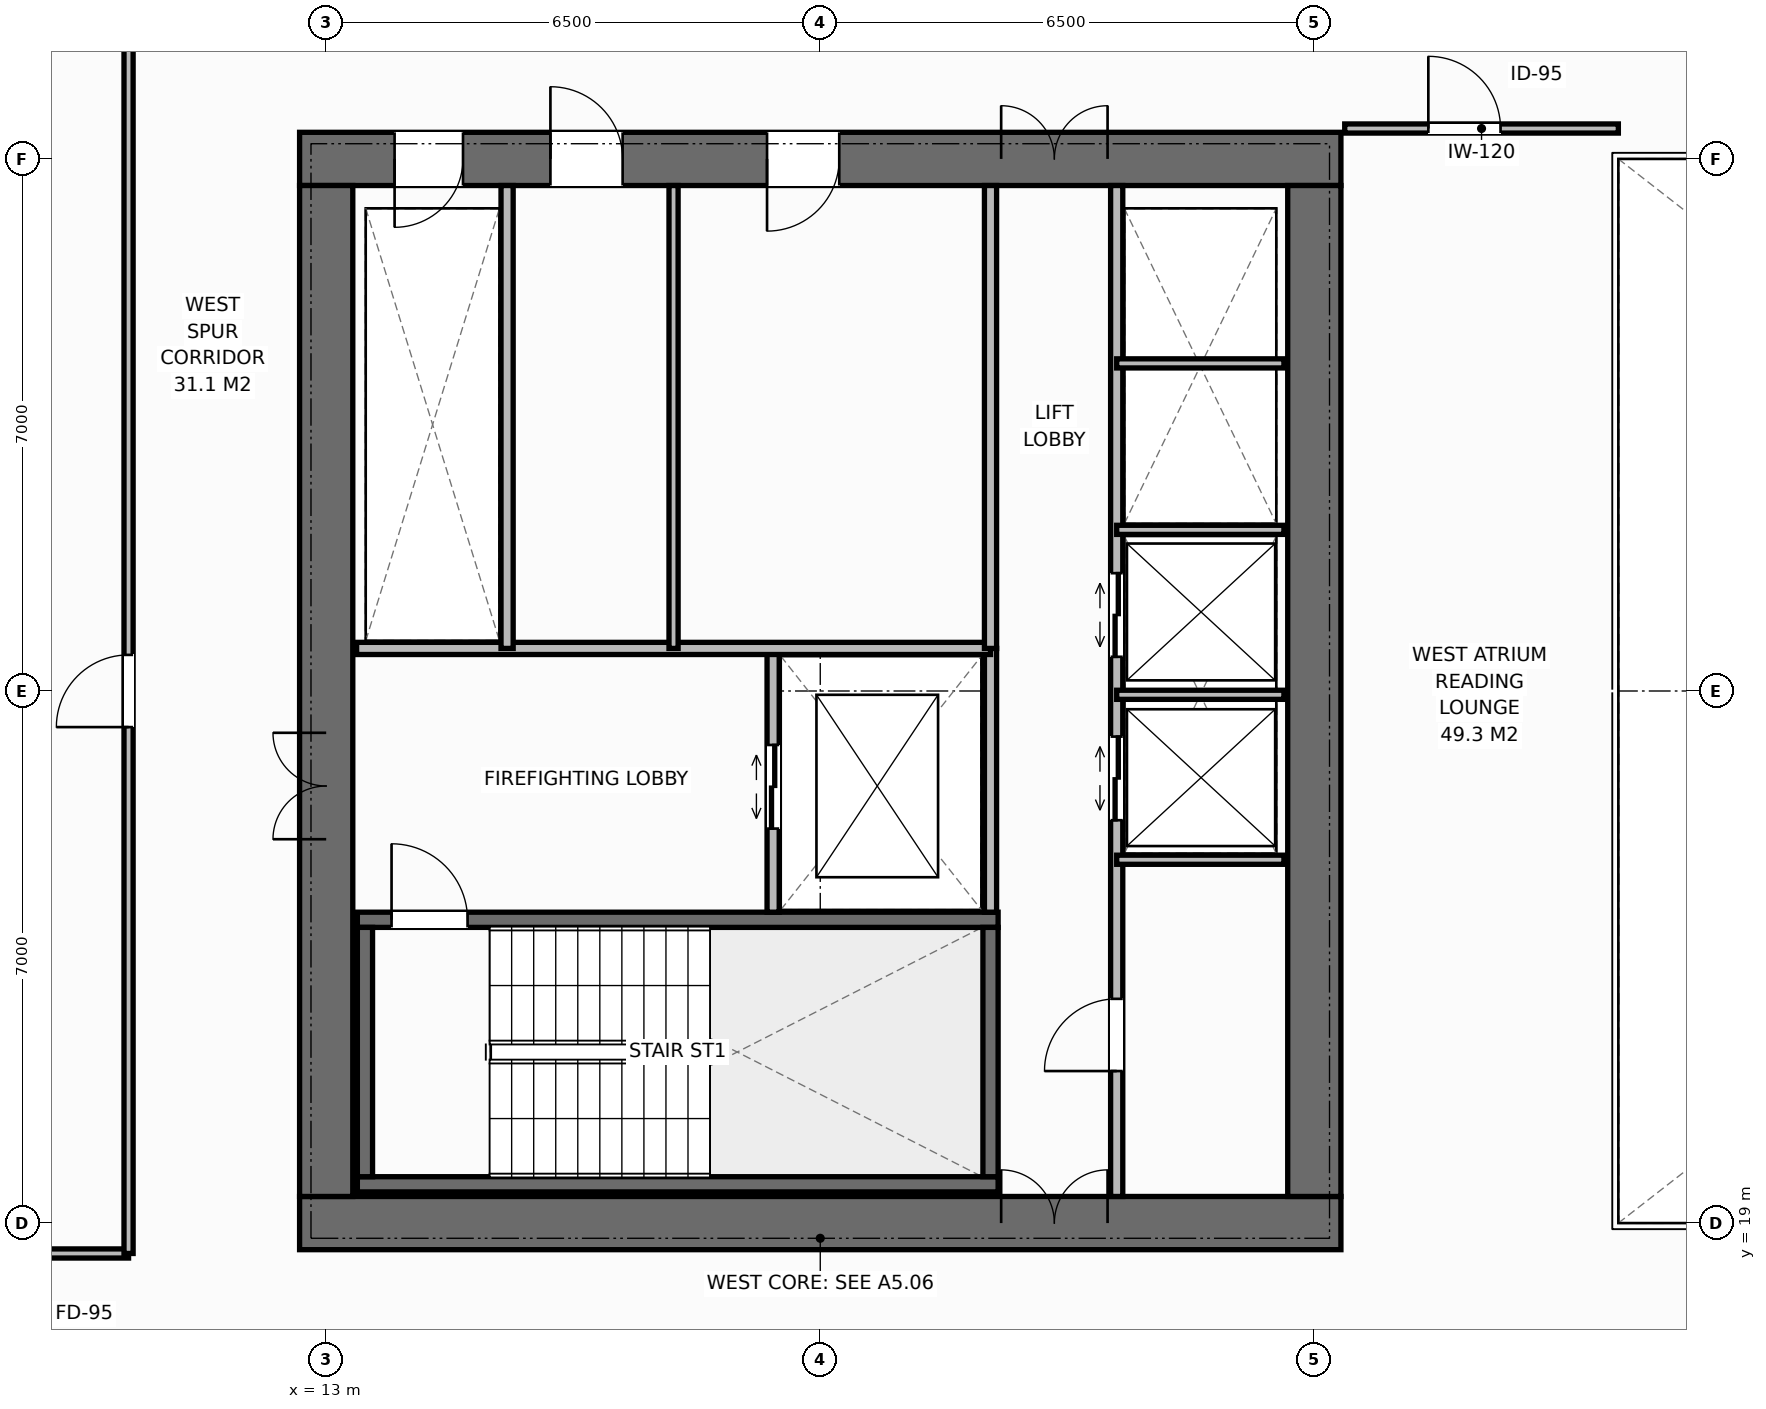
"""IFC4 building model, lengths in metres.
Left out: names, types, materials, properties, quantities, classifications, styles, units other than length and angle.
Written with IfcOpenShell. Run it as: python <this file> out.ifc"""

import sys

from ifc_helpers import new_model, si_unit, direction, frame, frame_2d, origin, place, context, subcontext, project, spatial, rectangle, extrude, element, fill, save


model = new_model("IFC4")
c1 = context("Model", 3, precision=1e-05, world=origin(), true_north=direction((0.0, 1.0)))
c2 = subcontext(c1, "Body", "Model", "MODEL_VIEW")
j1 = project(units=[si_unit("LENGTHUNIT", "METRE"), si_unit("PLANEANGLEUNIT", "RADIAN")], contexts=[c1])
p1 = place(None, origin())
s1 = spatial("IfcSite", under=j1, at=p1, CompositionType="ELEMENT")
p2 = place(p1, origin())
s2 = spatial("IfcBuilding", under=s1, at=p2, CompositionType="ELEMENT")
p3 = place(p2, frame((0.0, 0.0, 97.4)))
s3 = spatial("IfcBuildingStorey", under=s2, at=p3, CompositionType="ELEMENT", Elevation=97.4)
p4 = place(p3, frame((12.65, 19.0, 0.0), z_axis=(0.0, 0.0, 1.0), x_axis=(1.0, 0.0, 0.0)))
e1 = element("IfcWall", 1, at=p4, inside=s3, PredefinedType="SHEAR", context=c2, shape_type="SweptSolid", body=[
    extrude(rectangle(XDim=13.7, YDim=0.7, at=frame_2d((6.85, 0.0))), origin(), (0.0, 0.0, 1.0), 3.8),
])
p5 = place(p4, frame((9.23, 0.0, 0.0)))
e2 = element("IfcOpeningElement", 2, at=p5, cuts=e1, PredefinedType="OPENING", context=c2, shape_type="SweptSolid", body=[
    extrude(rectangle(XDim=1.4, YDim=2.2, at=frame_2d((0.7, 1.1))), frame((0.0, 0.36, 0.0), z_axis=(0.0, -1.0, 0.0), x_axis=(1.0, 0.0, 0.0)), (0.0, 0.0, 1.0), 0.72),
])
p6 = place(p3, frame((12.65, 33.0, 0.0), z_axis=(0.0, 0.0, 1.0), x_axis=(1.0, 0.0, 0.0)))
e3 = element("IfcWall", 3, at=p6, inside=s3, PredefinedType="SHEAR", context=c2, shape_type="SweptSolid", body=[
    extrude(rectangle(XDim=13.7, YDim=0.7, at=frame_2d((6.85, 0.0))), origin(), (0.0, 0.0, 1.0), 3.8),
])
p7 = place(p6, frame((1.25, 0.0, 0.0)))
e4 = element("IfcOpeningElement", 4, at=p7, cuts=e3, PredefinedType="OPENING", context=c2, shape_type="SweptSolid", body=[
    extrude(rectangle(XDim=0.9, YDim=2.15, at=frame_2d((0.45, 1.075))), frame((0.0, 0.36, 0.0), z_axis=(0.0, -1.0, 0.0), x_axis=(1.0, 0.0, 0.0)), (0.0, 0.0, 1.0), 0.72),
])
p8 = place(p6, frame((3.3, 0.0, 0.0)))
e5 = element("IfcOpeningElement", 5, at=p8, cuts=e3, PredefinedType="OPENING", context=c2, shape_type="SweptSolid", body=[
    extrude(rectangle(XDim=0.95, YDim=2.15, at=frame_2d((0.475, 1.075))), frame((0.0, 0.36, 0.0), z_axis=(0.0, -1.0, 0.0), x_axis=(1.0, 0.0, 0.0)), (0.0, 0.0, 1.0), 0.72),
])
p9 = place(p6, frame((6.15, 0.0, 0.0)))
e6 = element("IfcOpeningElement", 6, at=p9, cuts=e3, PredefinedType="OPENING", context=c2, shape_type="SweptSolid", body=[
    extrude(rectangle(XDim=0.95, YDim=2.15, at=frame_2d((0.475, 1.075))), frame((0.0, 0.36, 0.0), z_axis=(0.0, -1.0, 0.0), x_axis=(1.0, 0.0, 0.0)), (0.0, 0.0, 1.0), 0.72),
])
p10 = place(p6, frame((9.23, 0.0, 0.0)))
e7 = element("IfcOpeningElement", 7, at=p10, cuts=e3, PredefinedType="OPENING", context=c2, shape_type="SweptSolid", body=[
    extrude(rectangle(XDim=1.4, YDim=2.2, at=frame_2d((0.7, 1.1))), frame((0.0, 0.36, 0.0), z_axis=(0.0, -1.0, 0.0), x_axis=(1.0, 0.0, 0.0)), (0.0, 0.0, 1.0), 0.72),
])
p11 = place(p3, frame((13.0, 19.35, 0.0), z_axis=(0.0, 0.0, 1.0), x_axis=(0.0, 1.0, 0.0)))
e8 = element("IfcWall", 8, at=p11, inside=s3, PredefinedType="SHEAR", context=c2, shape_type="SweptSolid", body=[
    extrude(rectangle(XDim=13.3, YDim=0.7, at=frame_2d((6.65, 0.0))), origin(), (0.0, 0.0, 1.0), 3.8),
])
p12 = place(p11, frame((4.7, 0.0, 0.0)))
e9 = element("IfcOpeningElement", 9, at=p12, cuts=e8, PredefinedType="OPENING", context=c2, shape_type="SweptSolid", body=[
    extrude(rectangle(XDim=1.4, YDim=2.2, at=frame_2d((0.7, 1.1))), frame((0.0, 0.36, 0.0), z_axis=(0.0, -1.0, 0.0), x_axis=(1.0, 0.0, 0.0)), (0.0, 0.0, 1.0), 0.72),
])
p13 = place(p3, frame((26.0, 19.35, 0.0), z_axis=(0.0, 0.0, 1.0), x_axis=(0.0, 1.0, 0.0)))
e10 = element("IfcWall", 10, at=p13, inside=s3, PredefinedType="SHEAR", context=c2, shape_type="SweptSolid", body=[
    extrude(rectangle(XDim=13.3, YDim=0.7, at=frame_2d((6.65, 0.0))), origin(), (0.0, 0.0, 1.0), 3.8),
])
p14 = place(p3, frame((13.41, 19.51, 0.0), z_axis=(0.0, 0.0, 1.0), x_axis=(1.0, 0.0, 0.0)))
e11 = element("IfcWall", 11, at=p14, inside=s3, PredefinedType="SHEAR", context=c2, shape_type="SweptSolid", body=[
    extrude(rectangle(XDim=8.43, YDim=0.2, at=frame_2d((4.215, 0.0))), origin(), (0.0, 0.0, 1.0), 3.8),
])
p15 = place(p3, frame((13.41, 22.99, 0.0), z_axis=(0.0, 0.0, 1.0), x_axis=(1.0, 0.0, 0.0)))
e12 = element("IfcWall", 12, at=p15, inside=s3, PredefinedType="SHEAR", context=c2, shape_type="SweptSolid", body=[
    extrude(rectangle(XDim=8.43, YDim=0.2, at=frame_2d((4.215, 0.0))), origin(), (0.0, 0.0, 1.0), 3.8),
])
p16 = place(p15, frame((0.45, 0.0, 0.0)))
e13 = element("IfcOpeningElement", 13, at=p16, cuts=e12, PredefinedType="OPENING", context=c2, shape_type="SweptSolid", body=[
    extrude(rectangle(XDim=1.0, YDim=2.15, at=frame_2d((0.5, 1.075))), frame((0.0, 0.11, 0.0), z_axis=(0.0, -1.0, 0.0), x_axis=(1.0, 0.0, 0.0)), (0.0, 0.0, 1.0), 0.22),
])
for number, where, z_axis, x_axis in (
    (14, (13.51, 19.61, 0.0), (0.0, 0.0, 1.0), (0.0, 1.0, 0.0)),
    (15, (21.74, 19.61, 0.0), (0.0, 0.0, 1.0), (0.0, 1.0, 0.0)),
):
    element("IfcWall", number, at=place(p3, frame(where, z_axis=z_axis, x_axis=x_axis)), inside=s3, PredefinedType="SHEAR", context=c2, shape_type="SweptSolid", body=[
        extrude(rectangle(XDim=3.28, YDim=0.2, at=frame_2d((1.64, 0.0))), origin(), (0.0, 0.0, 1.0), 3.8),
    ])
p17 = place(p3, frame((21.74, 23.09, 0.0), z_axis=(0.0, 0.0, 1.0), x_axis=(0.0, 1.0, 0.0)))
e16 = element("IfcWall", 16, at=p17, inside=s3, PredefinedType="STANDARD", context=c2, shape_type="SweptSolid", body=[
    extrude(rectangle(XDim=3.47, YDim=0.16, at=frame_2d((1.735, 0.0))), origin(), (0.0, 0.0, 1.0), 3.565),
])
p18 = place(p3, frame((18.88, 23.09, 0.0), z_axis=(0.0, 0.0, 1.0), x_axis=(0.0, 1.0, 0.0)))
e17 = element("IfcWall", 17, at=p18, inside=s3, PredefinedType="STANDARD", context=c2, shape_type="SweptSolid", body=[
    extrude(rectangle(XDim=3.47, YDim=0.16, at=frame_2d((1.735, 0.0))), origin(), (0.0, 0.0, 1.0), 3.565),
])
p19 = place(p18, frame((1.1, 0.0, 0.0)))
e18 = element("IfcOpeningElement", 18, at=p19, cuts=e17, PredefinedType="OPENING", context=c2, shape_type="SweptSolid", body=[
    extrude(rectangle(XDim=1.1, YDim=2.2, at=frame_2d((0.55, 1.1))), frame((0.0, 0.09, 0.0), z_axis=(0.0, -1.0, 0.0), x_axis=(1.0, 0.0, 0.0)), (0.0, 0.0, 1.0), 0.18),
])
p20 = place(p3, frame((13.4, 26.56, 0.0), z_axis=(0.0, 0.0, 1.0), x_axis=(1.0, 0.0, 0.0)))
e19 = element("IfcWall", 19, at=p20, inside=s3, PredefinedType="STANDARD", context=c2, shape_type="SweptSolid", body=[
    extrude(rectangle(XDim=8.34, YDim=0.16, at=frame_2d((4.17, 0.0))), origin(), (0.0, 0.0, 1.0), 3.565),
])
p21 = place(p3, frame((15.38, 26.56, 0.0), z_axis=(0.0, 0.0, 1.0), x_axis=(0.0, 1.0, 0.0)))
e20 = element("IfcWall", 20, at=p21, inside=s3, PredefinedType="STANDARD", context=c2, shape_type="SweptSolid", body=[
    extrude(rectangle(XDim=6.09, YDim=0.16, at=frame_2d((3.045, 0.0))), origin(), (0.0, 0.0, 1.0), 3.565),
])
p22 = place(p3, frame((17.57, 26.56, 0.0), z_axis=(0.0, 0.0, 1.0), x_axis=(0.0, 1.0, 0.0)))
e21 = element("IfcWall", 21, at=p22, inside=s3, PredefinedType="PARTITIONING", context=c2, shape_type="SweptSolid", body=[
    extrude(rectangle(XDim=6.09, YDim=0.12, at=frame_2d((3.045, 0.0))), origin(), (0.0, 0.0, 1.0), 3.565),
])
p23 = place(p3, frame((21.74, 26.56, 0.0), z_axis=(0.0, 0.0, 1.0), x_axis=(0.0, 1.0, 0.0)))
e22 = element("IfcWall", 22, at=p23, inside=s3, PredefinedType="STANDARD", context=c2, shape_type="SweptSolid", body=[
    extrude(rectangle(XDim=6.09, YDim=0.16, at=frame_2d((3.045, 0.0))), origin(), (0.0, 0.0, 1.0), 3.565),
])
p24 = place(p3, frame((23.4, 19.35, 0.0), z_axis=(0.0, 0.0, 1.0), x_axis=(0.0, 1.0, 0.0)))
e23 = element("IfcWall", 23, at=p24, inside=s3, PredefinedType="STANDARD", context=c2, shape_type="SweptSolid", body=[
    extrude(rectangle(XDim=13.3, YDim=0.16, at=frame_2d((6.65, 0.0))), origin(), (0.0, 0.0, 1.0), 3.565),
])
p25 = place(p24, frame((1.65, 0.0, 0.0)))
e24 = element("IfcOpeningElement", 24, at=p25, cuts=e23, PredefinedType="OPENING", context=c2, shape_type="SweptSolid", body=[
    extrude(rectangle(XDim=0.95, YDim=2.15, at=frame_2d((0.475, 1.075))), frame((0.0, 0.09, 0.0), z_axis=(0.0, -1.0, 0.0), x_axis=(1.0, 0.0, 0.0)), (0.0, 0.0, 1.0), 0.18),
])
p26 = place(p24, frame((4.95, 0.0, 0.0)))
e25 = element("IfcOpeningElement", 25, at=p26, cuts=e23, PredefinedType="OPENING", context=c2, shape_type="SweptSolid", body=[
    extrude(rectangle(XDim=1.1, YDim=2.2, at=frame_2d((0.55, 1.1))), frame((0.0, 0.09, 0.0), z_axis=(0.0, -1.0, 0.0), x_axis=(1.0, 0.0, 0.0)), (0.0, 0.0, 1.0), 0.18),
])
p27 = place(p24, frame((7.1, 0.0, 0.0)))
e26 = element("IfcOpeningElement", 26, at=p27, cuts=e23, PredefinedType="OPENING", context=c2, shape_type="SweptSolid", body=[
    extrude(rectangle(XDim=1.1, YDim=2.2, at=frame_2d((0.55, 1.1))), frame((0.0, 0.09, 0.0), z_axis=(0.0, -1.0, 0.0), x_axis=(1.0, 0.0, 0.0)), (0.0, 0.0, 1.0), 0.18),
])
for number, where, z_axis, x_axis in (
    (27, (23.4, 23.78, 0.0), (0.0, 0.0, 1.0), (1.0, 0.0, 0.0)),
    (28, (23.4, 25.95, 0.0), (0.0, 0.0, 1.0), (1.0, 0.0, 0.0)),
    (29, (23.4, 28.12, 0.0), (0.0, 0.0, 1.0), (1.0, 0.0, 0.0)),
    (30, (23.4, 30.31, 0.0), (0.0, 0.0, 1.0), (1.0, 0.0, 0.0)),
):
    element("IfcWall", number, at=place(p3, frame(where, z_axis=z_axis, x_axis=x_axis)), inside=s3, PredefinedType="PARTITIONING", context=c2, shape_type="SweptSolid", body=[
        extrude(rectangle(XDim=2.2, YDim=0.12, at=frame_2d((1.1, 0.0))), origin(), (0.0, 0.0, 1.0), 3.565),
    ])
p28 = place(p3, frame((26.4, 33.4, 0.0), z_axis=(0.0, 0.0, 1.0), x_axis=(1.0, 0.0, 0.0)))
e31 = element("IfcWall", 31, at=p28, inside=s3, PredefinedType="PARTITIONING", context=c2, shape_type="SweptSolid", body=[
    extrude(rectangle(XDim=3.6, YDim=0.12, at=frame_2d((1.8, 0.0))), origin(), (0.0, 0.0, 1.0), 3.565),
])
p29 = place(p28, frame((1.1, 0.0, 0.0)))
e32 = element("IfcOpeningElement", 32, at=p29, cuts=e31, PredefinedType="OPENING", context=c2, shape_type="SweptSolid", body=[
    extrude(rectangle(XDim=0.95, YDim=2.15, at=frame_2d((0.475, 1.075))), frame((0.0, 0.07, 0.0), z_axis=(0.0, -1.0, 0.0), x_axis=(1.0, 0.0, 0.0)), (0.0, 0.0, 1.0), 0.14),
])
p30 = place(p3, frame((1.82, 18.6, 0.0), z_axis=(0.0, 0.0, 1.0), x_axis=(1.0, 0.0, 0.0)))
e33 = element("IfcWall", 33, at=p30, inside=s3, PredefinedType="PARTITIONING", context=c2, shape_type="SweptSolid", body=[
    extrude(rectangle(XDim=8.58, YDim=0.12, at=frame_2d((4.29, 0.0))), origin(), (0.0, 0.0, 1.0), 3.565),
])
p31 = place(p3, frame((10.4, 18.6, 0.0), z_axis=(0.0, 0.0, 1.0), x_axis=(0.0, 1.0, 0.0)))
e34 = element("IfcWall", 34, at=p31, inside=s3, PredefinedType="PARTITIONING", context=c2, shape_type="SweptSolid", body=[
    extrude(rectangle(XDim=16.9, YDim=0.12, at=frame_2d((8.45, 0.0))), origin(), (0.0, 0.0, 1.0), 3.565),
])
p32 = place(p31, frame((6.925, 0.0, 0.0)))
e35 = element("IfcOpeningElement", 35, at=p32, cuts=e34, PredefinedType="OPENING", context=c2, shape_type="SweptSolid", body=[
    extrude(rectangle(XDim=0.95, YDim=2.15, at=frame_2d((0.475, 1.075))), frame((0.0, 0.07, 0.0), z_axis=(0.0, -1.0, 0.0), x_axis=(1.0, 0.0, 0.0)), (0.0, 0.0, 1.0), 0.14),
])
p33 = place(p16, origin())
e36 = element("IfcDoor", 36, at=p33, inside=s3, OperationType="SINGLE_SWING_LEFT", PredefinedType="DOOR", context=c2, shape_type="SweptSolid", body=[
    extrude(rectangle(XDim=1.0, YDim=2.15, at=frame_2d((0.5, 1.075))), frame((0.0, 0.025, 0.0), z_axis=(0.0, -1.0, 0.0), x_axis=(1.0, 0.0, 0.0)), (0.0, 0.0, 1.0), 0.05),
])
fill(e13, e36)
p34 = place(p12, origin())
e37 = element("IfcDoor", 37, at=p34, inside=s3, OperationType="DOUBLE_DOOR_SINGLE_SWING", PredefinedType="DOOR", context=c2, shape_type="SweptSolid", body=[
    extrude(rectangle(XDim=1.4, YDim=2.2, at=frame_2d((0.7, 1.1))), frame((0.0, 0.025, 0.0), z_axis=(0.0, -1.0, 0.0), x_axis=(1.0, 0.0, 0.0)), (0.0, 0.0, 1.0), 0.05),
])
fill(e9, e37)
p35 = place(p19, origin())
e38 = element("IfcDoor", 38, at=p35, inside=s3, OperationType="DOUBLE_DOOR_SLIDING", PredefinedType="DOOR", context=c2, shape_type="SweptSolid", body=[
    extrude(rectangle(XDim=1.1, YDim=2.2, at=frame_2d((0.55, 1.1))), frame((0.0, 0.025, 0.0), z_axis=(0.0, -1.0, 0.0), x_axis=(1.0, 0.0, 0.0)), (0.0, 0.0, 1.0), 0.05),
])
fill(e18, e38)
p36 = place(p7, origin())
e39 = element("IfcDoor", 39, at=p36, inside=s3, OperationType="SINGLE_SWING_RIGHT", PredefinedType="DOOR", context=c2, shape_type="SweptSolid", body=[
    extrude(rectangle(XDim=0.9, YDim=2.15, at=frame_2d((0.45, 1.075))), frame((0.0, -0.075, 0.0), z_axis=(0.0, -1.0, 0.0), x_axis=(1.0, 0.0, 0.0)), (0.0, 0.0, 1.0), 0.05),
])
fill(e4, e39)
p37 = place(p8, origin())
e40 = element("IfcDoor", 40, at=p37, inside=s3, OperationType="SINGLE_SWING_LEFT", PredefinedType="DOOR", context=c2, shape_type="SweptSolid", body=[
    extrude(rectangle(XDim=0.95, YDim=2.15, at=frame_2d((0.475, 1.075))), frame((0.0, -0.075, 0.0), z_axis=(0.0, -1.0, 0.0), x_axis=(1.0, 0.0, 0.0)), (0.0, 0.0, 1.0), 0.05),
])
fill(e5, e40)
p38 = place(p9, origin())
e41 = element("IfcDoor", 41, at=p38, inside=s3, OperationType="SINGLE_SWING_RIGHT", PredefinedType="DOOR", context=c2, shape_type="SweptSolid", body=[
    extrude(rectangle(XDim=0.95, YDim=2.15, at=frame_2d((0.475, 1.075))), frame((0.0, -0.075, 0.0), z_axis=(0.0, -1.0, 0.0), x_axis=(1.0, 0.0, 0.0)), (0.0, 0.0, 1.0), 0.05),
])
fill(e6, e41)
p39 = place(p5, origin())
e42 = element("IfcDoor", 42, at=p39, inside=s3, OperationType="DOUBLE_DOOR_SINGLE_SWING", PredefinedType="DOOR", context=c2, shape_type="SweptSolid", body=[
    extrude(rectangle(XDim=1.4, YDim=2.2, at=frame_2d((0.7, 1.1))), frame((0.0, 0.125, 0.0), z_axis=(0.0, -1.0, 0.0), x_axis=(1.0, 0.0, 0.0)), (0.0, 0.0, 1.0), 0.05),
])
fill(e2, e42)
p40 = place(p10, origin())
e43 = element("IfcDoor", 43, at=p40, inside=s3, OperationType="DOUBLE_DOOR_SINGLE_SWING", PredefinedType="DOOR", context=c2, shape_type="SweptSolid", body=[
    extrude(rectangle(XDim=1.4, YDim=2.2, at=frame_2d((0.7, 1.1))), frame((0.0, -0.075, 0.0), z_axis=(0.0, -1.0, 0.0), x_axis=(1.0, 0.0, 0.0)), (0.0, 0.0, 1.0), 0.05),
])
fill(e7, e43)
p41 = place(p25, origin())
e44 = element("IfcDoor", 44, at=p41, inside=s3, OperationType="SINGLE_SWING_LEFT", PredefinedType="DOOR", context=c2, shape_type="SweptSolid", body=[
    extrude(rectangle(XDim=0.95, YDim=2.15, at=frame_2d((0.475, 1.075))), frame((0.0, 0.025, 0.0), z_axis=(0.0, -1.0, 0.0), x_axis=(1.0, 0.0, 0.0)), (0.0, 0.0, 1.0), 0.05),
])
fill(e24, e44)
p42 = place(p26, origin())
e45 = element("IfcDoor", 45, at=p42, inside=s3, OperationType="DOUBLE_DOOR_SLIDING", PredefinedType="DOOR", context=c2, shape_type="SweptSolid", body=[
    extrude(rectangle(XDim=1.1, YDim=2.2, at=frame_2d((0.55, 1.1))), frame((0.0, 0.025, 0.0), z_axis=(0.0, -1.0, 0.0), x_axis=(1.0, 0.0, 0.0)), (0.0, 0.0, 1.0), 0.05),
])
fill(e25, e45)
p43 = place(p27, origin())
e46 = element("IfcDoor", 46, at=p43, inside=s3, OperationType="DOUBLE_DOOR_SLIDING", PredefinedType="DOOR", context=c2, shape_type="SweptSolid", body=[
    extrude(rectangle(XDim=1.1, YDim=2.2, at=frame_2d((0.55, 1.1))), frame((0.0, 0.025, 0.0), z_axis=(0.0, -1.0, 0.0), x_axis=(1.0, 0.0, 0.0)), (0.0, 0.0, 1.0), 0.05),
])
fill(e26, e46)
p44 = place(p29, origin())
e47 = element("IfcDoor", 47, at=p44, inside=s3, OperationType="SINGLE_SWING_LEFT", PredefinedType="DOOR", context=c2, shape_type="SweptSolid", body=[
    extrude(rectangle(XDim=0.95, YDim=2.15, at=frame_2d((0.475, 1.075))), frame((0.0, 0.025, 0.0), z_axis=(0.0, -1.0, 0.0), x_axis=(1.0, 0.0, 0.0)), (0.0, 0.0, 1.0), 0.05),
])
fill(e32, e47)
p45 = place(p32, origin())
e48 = element("IfcDoor", 48, at=p45, inside=s3, OperationType="SINGLE_SWING_LEFT", PredefinedType="DOOR", context=c2, shape_type="SweptSolid", body=[
    extrude(rectangle(XDim=0.95, YDim=2.15, at=frame_2d((0.475, 1.075))), frame((0.0, 0.025, 0.0), z_axis=(0.0, -1.0, 0.0), x_axis=(1.0, 0.0, 0.0)), (0.0, 0.0, 1.0), 0.05),
])
fill(e35, e48)
save(model, sys.argv[1])
